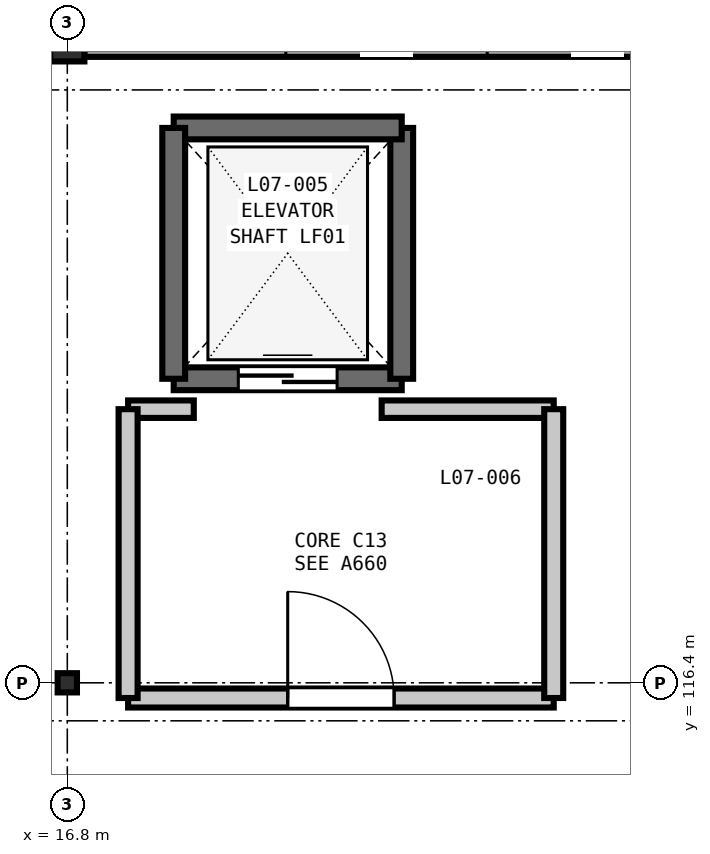
"""IFC4 building model, lengths in metres.
Left out: names, types, materials, properties, quantities, classifications, styles, units other than length and angle.
Written with IfcOpenShell. Run it as: python <this file> out.ifc"""

import sys

from ifc_helpers import new_model, si_unit, direction, frame, frame_2d, origin, origin_2d, place, context, subcontext, project, spatial, rectangle, i_section, extrude, element, fill, save


model = new_model("IFC4")
c1 = context("Model", 3, precision=1e-05, world=origin(), true_north=direction((0.0, 1.0)))
c2 = subcontext(c1, "Body", "Model", "MODEL_VIEW")
j1 = project(units=[si_unit("LENGTHUNIT", "METRE"), si_unit("PLANEANGLEUNIT", "RADIAN")], contexts=[c1])
p1 = place(None, origin())
s1 = spatial("IfcSite", under=j1, at=p1, CompositionType="ELEMENT")
p2 = place(p1, origin())
s2 = spatial("IfcBuilding", under=s1, at=p2, CompositionType="ELEMENT")
p3 = place(p2, frame((0.0, 0.0, 33.0)))
s3 = spatial("IfcBuildingStorey", under=s2, at=p3, CompositionType="ELEMENT", Elevation=33.0)
p4 = place(p3, frame((16.8, 116.4, 0.0), z_axis=(0.0, 0.0, 1.0), x_axis=(1.0, 0.0, 0.0)))
e1 = element("IfcColumn", 1, at=p4, inside=s3, PredefinedType="COLUMN", context=c2, shape_type="SweptSolid", body=[
    extrude(i_section(OverallWidth=0.254, OverallDepth=0.253, WebThickness=0.009, FlangeThickness=0.014, FilletRadius=0.013, at=origin_2d()), origin(), (0.0, 0.0, 1.0), 4.2),
])
p5 = place(p3, frame((16.8, 124.8, 0.0), z_axis=(0.0, 0.0, 1.0), x_axis=(1.0, 0.0, 0.0)))
e2 = element("IfcColumn", 2, at=p5, inside=s3, PredefinedType="COLUMN", context=c2, shape_type="SweptSolid", body=[
    extrude(rectangle(XDim=0.45, YDim=0.45, at=origin_2d()), origin(), (0.0, 0.0, 1.0), 4.2),
])
p6 = place(p3, frame((17.023, 124.8, 0.0), z_axis=(0.0, 0.0, 1.0), x_axis=(1.0, 0.0, 0.0)))
e3 = element("IfcWall", 3, at=p6, inside=s3, PredefinedType="SOLIDWALL", context=c2, shape_type="SweptSolid", body=[
    extrude(rectangle(XDim=7.954, YDim=0.33, at=frame_2d((3.977, 0.0))), origin(), (0.0, 0.0, 1.0), 3.48),
])
p7 = place(p6, frame((2.652, 0.0, 0.9)))
e4 = element("IfcOpeningElement", 4, at=p7, cuts=e3, PredefinedType="OPENING", context=c2, shape_type="SweptSolid", body=[
    extrude(rectangle(XDim=2.65, YDim=1.95, at=frame_2d((1.325, 0.975))), frame((0.0, 0.175, 0.0), z_axis=(0.0, -1.0, 0.0), x_axis=(1.0, 0.0, 0.0)), (0.0, 0.0, 1.0), 0.35),
])
p8 = place(p3, frame((18.2, 120.4, 0.0), z_axis=(0.0, 0.0, 1.0), x_axis=(1.0, 0.0, 0.0)))
e5 = element("IfcWall", 5, at=p8, inside=s3, PredefinedType="SHEAR", context=c2, shape_type="SweptSolid", body=[
    extrude(rectangle(XDim=3.0, YDim=0.3, at=frame_2d((1.5, 0.0))), origin(), (0.0, 0.0, 1.0), 4.2),
])
p9 = place(p8, frame((0.85, 0.0, 0.0)))
e6 = element("IfcOpeningElement", 6, at=p9, cuts=e5, PredefinedType="OPENING", context=c2, shape_type="SweptSolid", body=[
    extrude(rectangle(XDim=1.3, YDim=2.2, at=frame_2d((0.65, 1.1))), frame((0.0, 0.16, 0.0), z_axis=(0.0, -1.0, 0.0), x_axis=(1.0, 0.0, 0.0)), (0.0, 0.0, 1.0), 0.32),
])
p10 = place(p3, frame((21.2, 120.4, 0.0), z_axis=(0.0, 0.0, 1.0), x_axis=(0.0, 1.0, 0.0)))
e7 = element("IfcWall", 7, at=p10, inside=s3, PredefinedType="SHEAR", context=c2, shape_type="SweptSolid", body=[
    extrude(rectangle(XDim=3.3, YDim=0.3, at=frame_2d((1.65, 0.0))), origin(), (0.0, 0.0, 1.0), 4.2),
])
p11 = place(p3, frame((21.2, 123.7, 0.0), z_axis=(0.0, 0.0, 1.0), x_axis=(-1.0, 0.0, 0.0)))
e8 = element("IfcWall", 8, at=p11, inside=s3, PredefinedType="SHEAR", context=c2, shape_type="SweptSolid", body=[
    extrude(rectangle(XDim=3.0, YDim=0.3, at=frame_2d((1.5, 0.0))), origin(), (0.0, 0.0, 1.0), 4.2),
])
p12 = place(p3, frame((18.2, 123.7, 0.0), z_axis=(0.0, 0.0, 1.0), x_axis=(0.0, -1.0, 0.0)))
e9 = element("IfcWall", 9, at=p12, inside=s3, PredefinedType="SHEAR", context=c2, shape_type="SweptSolid", body=[
    extrude(rectangle(XDim=3.3, YDim=0.3, at=frame_2d((1.65, 0.0))), origin(), (0.0, 0.0, 1.0), 4.2),
])
p13 = place(p3, frame((17.6, 116.2, 0.0), z_axis=(0.0, 0.0, 1.0), x_axis=(1.0, 0.0, 0.0)))
e10 = element("IfcWall", 10, at=p13, inside=s3, PredefinedType="PARTITIONING", context=c2, shape_type="SweptSolid", body=[
    extrude(rectangle(XDim=5.6, YDim=0.25, at=frame_2d((2.8, 0.0))), origin(), (0.0, 0.0, 1.0), 3.685),
])
p14 = place(p13, frame((2.1, 0.0, 0.0)))
e11 = element("IfcOpeningElement", 11, at=p14, cuts=e10, PredefinedType="OPENING", context=c2, shape_type="SweptSolid", body=[
    extrude(rectangle(XDim=1.4, YDim=2.2, at=frame_2d((0.7, 1.1))), frame((0.0, 0.135, 0.0), z_axis=(0.0, -1.0, 0.0), x_axis=(1.0, 0.0, 0.0)), (0.0, 0.0, 1.0), 0.27),
])
p15 = place(p3, frame((20.936, 120.0, 0.0), z_axis=(0.0, 0.0, 1.0), x_axis=(1.0, 0.0, 0.0)))
e12 = element("IfcWall", 12, at=p15, inside=s3, PredefinedType="PARTITIONING", context=c2, shape_type="SweptSolid", body=[
    extrude(rectangle(XDim=2.264, YDim=0.23, at=frame_2d((1.132, 0.0))), origin(), (0.0, 0.0, 1.0), 3.92),
])
p16 = place(p3, frame((17.6, 120.0, 0.0), z_axis=(0.0, 0.0, 1.0), x_axis=(1.0, 0.0, 0.0)))
e13 = element("IfcWall", 13, at=p16, inside=s3, PredefinedType="PARTITIONING", context=c2, shape_type="SweptSolid", body=[
    extrude(rectangle(XDim=0.864, YDim=0.23, at=frame_2d((0.432, 0.0))), origin(), (0.0, 0.0, 1.0), 3.92),
])
for number, where, z_axis, x_axis in (
    (14, (17.6, 116.2, 0.0), (0.0, 0.0, 1.0), (0.0, 1.0, 0.0)),
    (15, (23.2, 116.2, 0.0), (0.0, 0.0, 1.0), (0.0, 1.0, 0.0)),
):
    element("IfcWall", number, at=place(p3, frame(where, z_axis=z_axis, x_axis=x_axis)), inside=s3, PredefinedType="PARTITIONING", context=c2, shape_type="SweptSolid", body=[
        extrude(rectangle(XDim=3.8, YDim=0.25, at=frame_2d((1.9, 0.0))), origin(), (0.0, 0.0, 1.0), 3.92),
    ])
p17 = place(p9, origin())
e16 = element("IfcDoor", 16, at=p17, inside=s3, OperationType="DOUBLE_DOOR_SLIDING", PredefinedType="DOOR", context=c2, shape_type="SweptSolid", body=[
    extrude(rectangle(XDim=1.3, YDim=2.2, at=frame_2d((0.65, 1.1))), frame((0.0, 0.025, 0.0), z_axis=(0.0, -1.0, 0.0), x_axis=(1.0, 0.0, 0.0)), (0.0, 0.0, 1.0), 0.05),
])
fill(e6, e16)
p18 = place(p14, origin())
e17 = element("IfcDoor", 17, at=p18, inside=s3, OperationType="SINGLE_SWING_LEFT", PredefinedType="DOOR", context=c2, shape_type="SweptSolid", body=[
    extrude(rectangle(XDim=1.4, YDim=2.2, at=frame_2d((0.7, 1.1))), frame((0.0, 0.025, 0.0), z_axis=(0.0, -1.0, 0.0), x_axis=(1.0, 0.0, 0.0)), (0.0, 0.0, 1.0), 0.05),
])
fill(e11, e17)
save(model, sys.argv[1])
